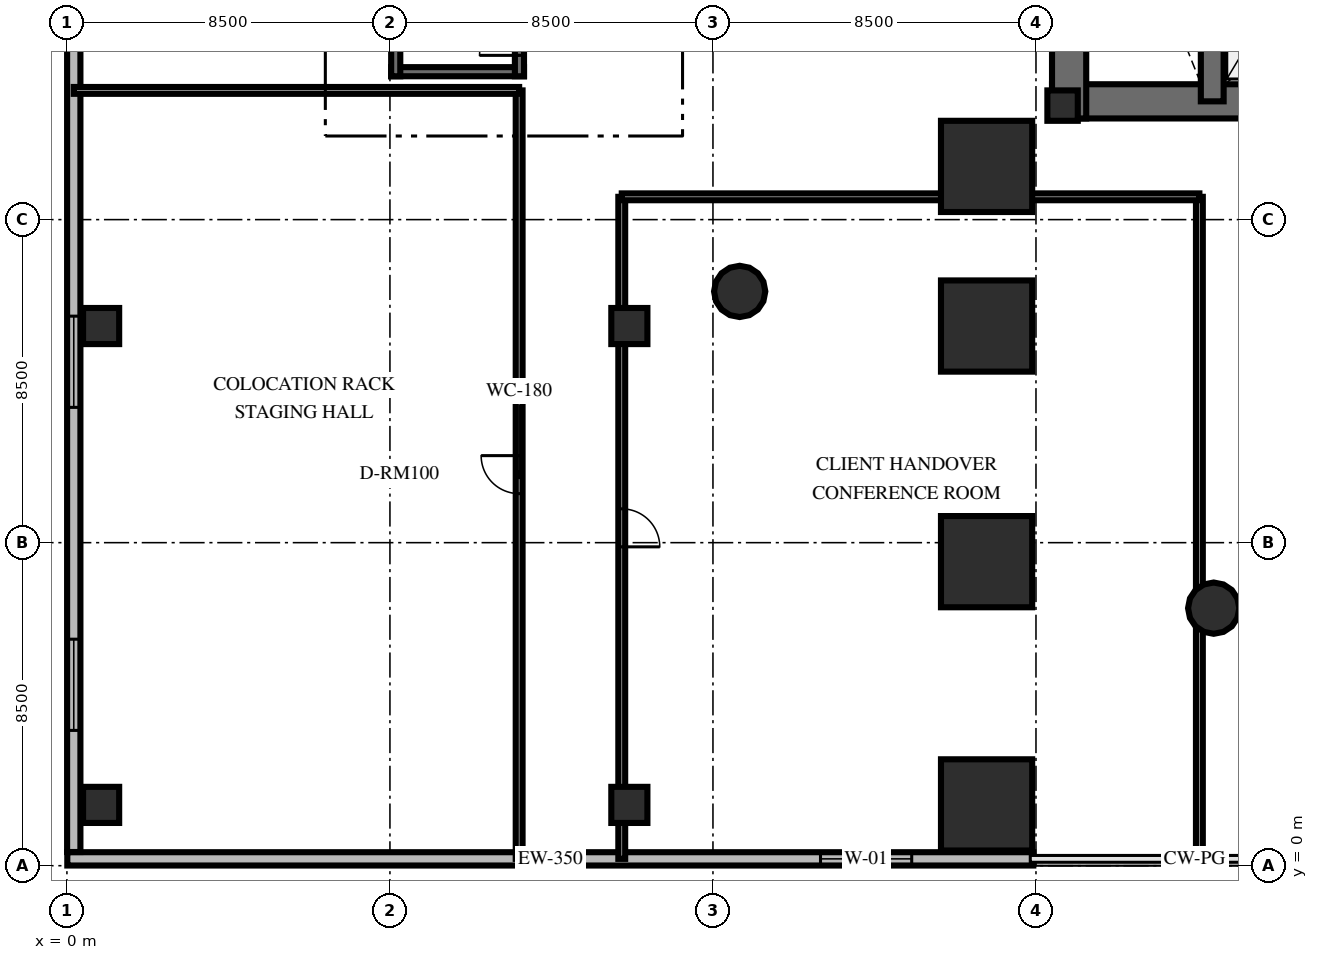
"""IFC4 building model, lengths in metres.
Left out: names, types, materials, properties, quantities, classifications, styles, units other than length and angle.
Written with IfcOpenShell. Run it as: python <this file> out.ifc"""

import sys

from ifc_helpers import new_model, si_unit, direction, frame, frame_2d, origin, origin_2d, place, context, subcontext, project, spatial, rectangle, circle, extrude, element, fill, save


model = new_model("IFC4")
c1 = context("Model", 3, precision=1e-05, world=origin(), true_north=direction((0.0, 1.0)))
c2 = subcontext(c1, "Body", "Model", "MODEL_VIEW")
j1 = project(units=[si_unit("LENGTHUNIT", "METRE"), si_unit("PLANEANGLEUNIT", "RADIAN")], contexts=[c1])
p1 = place(None, origin())
s1 = spatial("IfcSite", under=j1, at=p1, CompositionType="ELEMENT")
p2 = place(p1, origin())
s2 = spatial("IfcBuilding", under=s1, at=p2, CompositionType="ELEMENT")
p3 = place(p2, frame((0.0, 0.0, 25.2)))
s3 = spatial("IfcBuildingStorey", under=s2, at=p3, CompositionType="ELEMENT", Elevation=25.2)
p4 = place(p3, frame((25.922, 20.112, 0.0), z_axis=(0.0, 0.0, 1.0), x_axis=(1.0, 0.0, 0.0)))
e1 = element("IfcWall", 1, at=p4, inside=s3, PredefinedType="SHEAR", context=c2, shape_type="SweptSolid", body=[
    extrude(rectangle(XDim=16.166, YDim=0.9, at=frame_2d((8.083, 0.0))), origin(), (0.0, 0.0, 1.0), 4.8),
])
p5 = place(p3, frame((26.372, 19.662, 0.0), z_axis=(0.0, 0.0, 1.0), x_axis=(0.0, 1.0, 0.0)))
e2 = element("IfcWall", 2, at=p5, inside=s3, PredefinedType="SHEAR", context=c2, shape_type="SweptSolid", body=[
    extrude(rectangle(XDim=10.876, YDim=0.9, at=frame_2d((5.438, 0.0))), origin(), (0.0, 0.0, 1.0), 4.8),
])
p6 = place(p3, frame((30.138, 20.112, 0.0), z_axis=(0.0, 0.0, 1.0), x_axis=(0.0, 1.0, 0.0)))
e3 = element("IfcWall", 3, at=p6, inside=s3, PredefinedType="SHEAR", context=c2, shape_type="SweptSolid", body=[
    extrude(rectangle(XDim=9.976, YDim=0.6, at=frame_2d((4.988, 0.0))), origin(), (0.0, 0.0, 1.0), 4.8),
])
p7 = place(p3, frame((26.2, 20.0, 0.0), z_axis=(0.0, 0.0, 1.0), x_axis=(1.0, 0.0, 0.0)))
e4 = element("IfcColumn", 4, at=p7, inside=s3, PredefinedType="PILASTER", context=c2, shape_type="SweptSolid", body=[
    extrude(rectangle(XDim=0.8, YDim=0.8, at=origin_2d()), origin(), (0.0, 0.0, 1.0), 4.8),
])
p8 = place(p3, frame((8.532, 20.892, 0.0), z_axis=(0.0, 0.0, 1.0), x_axis=(1.0, 0.0, 0.0)))
e5 = element("IfcWall", 5, at=p8, inside=s3, PredefinedType="SHEAR", context=c2, shape_type="SweptSolid", body=[
    extrude(rectangle(XDim=3.496, YDim=0.24, at=frame_2d((1.748, 0.0))), origin(), (0.0, 0.0, 1.0), 4.8),
])
p9 = place(p3, frame((8.652, 20.772, 0.0), z_axis=(0.0, 0.0, 1.0), x_axis=(0.0, 1.0, 0.0)))
e6 = element("IfcWall", 6, at=p9, inside=s3, PredefinedType="SHEAR", context=c2, shape_type="SweptSolid", body=[
    extrude(rectangle(XDim=9.556, YDim=0.24, at=frame_2d((4.778, 0.0))), origin(), (0.0, 0.0, 1.0), 4.8),
])
p10 = place(p3, frame((11.908, 20.772, 0.0), z_axis=(0.0, 0.0, 1.0), x_axis=(0.0, 1.0, 0.0)))
e7 = element("IfcWall", 7, at=p10, inside=s3, PredefinedType="SHEAR", context=c2, shape_type="SweptSolid", body=[
    extrude(rectangle(XDim=9.556, YDim=0.24, at=frame_2d((4.778, 0.0))), origin(), (0.0, 0.0, 1.0), 4.8),
])
p11 = place(p10, frame((0.55, 0.0, 0.0)))
e8 = element("IfcOpeningElement", 8, at=p11, cuts=e7, PredefinedType="OPENING", context=c2, shape_type="SweptSolid", body=[
    extrude(rectangle(XDim=1.05, YDim=2.15, at=frame_2d((0.525, 1.075))), frame((0.0, 0.13, 0.0), z_axis=(0.0, -1.0, 0.0), x_axis=(1.0, 0.0, 0.0)), (0.0, 0.0, 1.0), 0.26),
])
for number, where, z_axis, x_axis in (
    (9, (24.2, 1.6, 0.0), (0.0, 0.0, 1.0), (1.0, 0.0, 0.0)),
    (10, (24.2, 8.0, 0.0), (0.0, 0.0, 1.0), (1.0, 0.0, 0.0)),
    (11, (24.2, 14.2, 0.0), (0.0, 0.0, 1.0), (1.0, 0.0, 0.0)),
    (12, (24.2, 18.4, 0.0), (0.0, 0.0, 1.0), (1.0, 0.0, 0.0)),
):
    element("IfcColumn", number, at=place(p3, frame(where, z_axis=z_axis, x_axis=x_axis)), inside=s3, PredefinedType="USERDEFINED", context=c2, shape_type="SweptSolid", body=[
        extrude(rectangle(XDim=2.4, YDim=2.4, at=origin_2d()), origin(), (0.0, 0.0, 1.0), 4.52),
    ])
for number, where, z_axis, x_axis in (
    (13, (0.9, 1.6, 0.0), (0.0, 0.0, 1.0), (1.0, 0.0, 0.0)),
    (14, (0.9, 14.2, 0.0), (0.0, 0.0, 1.0), (1.0, 0.0, 0.0)),
    (15, (14.8, 1.6, 0.0), (0.0, 0.0, 1.0), (1.0, 0.0, 0.0)),
    (16, (14.8, 14.2, 0.0), (0.0, 0.0, 1.0), (1.0, 0.0, 0.0)),
):
    element("IfcColumn", number, at=place(p3, frame(where, z_axis=z_axis, x_axis=x_axis)), inside=s3, PredefinedType="COLUMN", context=c2, shape_type="SweptSolid", body=[
        extrude(rectangle(XDim=0.95, YDim=0.95, at=origin_2d()), origin(), (0.0, 0.0, 1.0), 4.8),
    ])
for number, where, z_axis, x_axis in (
    (17, (17.703, 15.111, 0.0), (0.0, 0.0, 1.0), (1.0, 0.0, 0.0)),
    (18, (30.176, 6.777, 0.0), (0.0, 0.0, 1.0), (1.0, 0.0, 0.0)),
):
    element("IfcColumn", number, at=place(p3, frame(where, z_axis=z_axis, x_axis=x_axis)), inside=s3, PredefinedType="COLUMN", context=c2, shape_type="SweptSolid", body=[
        extrude(circle(Radius=0.675, at=origin_2d()), origin(), (0.0, 0.0, 1.0), 4.8),
    ])
p12 = place(p3, frame((25.43, 0.18, 0.0), z_axis=(0.0, 0.0, 1.0), x_axis=(-1.0, 0.0, 0.0)))
e19 = element("IfcWall", 19, at=p12, inside=s3, PredefinedType="SOLIDWALL", context=c2, shape_type="SweptSolid", body=[
    extrude(rectangle(XDim=25.42, YDim=0.35, at=frame_2d((12.71, 0.0))), origin(), (0.0, 0.0, 1.0), 3.8),
])
p13 = place(p12, frame((3.2, 0.0, 0.85)))
e20 = element("IfcOpeningElement", 20, at=p13, cuts=e19, PredefinedType="OPENING", context=c2, shape_type="SweptSolid", body=[
    extrude(rectangle(XDim=2.4, YDim=2.4, at=frame_2d((1.2, 1.2))), frame((0.0, 0.185, 0.0), z_axis=(0.0, -1.0, 0.0), x_axis=(1.0, 0.0, 0.0)), (0.0, 0.0, 1.0), 0.37),
])
p14 = place(p3, frame((0.18, 0.36, 0.0), z_axis=(0.0, 0.0, 1.0), x_axis=(0.0, 1.0, 0.0)))
e21 = element("IfcWall", 21, at=p14, inside=s3, PredefinedType="SOLIDWALL", context=c2, shape_type="SweptSolid", body=[
    extrude(rectangle(XDim=51.28, YDim=0.35, at=frame_2d((25.64, 0.0))), origin(), (0.0, 0.0, 1.0), 3.8),
])
p15 = place(p14, frame((3.2, 0.0, 0.85)))
e22 = element("IfcOpeningElement", 22, at=p15, cuts=e21, PredefinedType="OPENING", context=c2, shape_type="SweptSolid", body=[
    extrude(rectangle(XDim=2.4, YDim=2.4, at=frame_2d((1.2, 1.2))), frame((0.0, 0.185, 0.0), z_axis=(0.0, -1.0, 0.0), x_axis=(1.0, 0.0, 0.0)), (0.0, 0.0, 1.0), 0.37),
])
p16 = place(p14, frame((11.7, 0.0, 0.85)))
e23 = element("IfcOpeningElement", 23, at=p16, cuts=e21, PredefinedType="OPENING", context=c2, shape_type="SweptSolid", body=[
    extrude(rectangle(XDim=2.4, YDim=2.4, at=frame_2d((1.2, 1.2))), frame((0.0, 0.185, 0.0), z_axis=(0.0, -1.0, 0.0), x_axis=(1.0, 0.0, 0.0)), (0.0, 0.0, 1.0), 0.37),
])
p17 = place(p14, frame((22.05, 0.0, 0.85)))
e24 = element("IfcOpeningElement", 24, at=p17, cuts=e21, PredefinedType="OPENING", context=c2, shape_type="SweptSolid", body=[
    extrude(rectangle(XDim=2.4, YDim=2.4, at=frame_2d((1.2, 1.2))), frame((0.0, 0.185, 0.0), z_axis=(0.0, -1.0, 0.0), x_axis=(1.0, 0.0, 0.0)), (0.0, 0.0, 1.0), 0.37),
])
p18 = place(p14, frame((37.2, 0.0, 0.85)))
e25 = element("IfcOpeningElement", 25, at=p18, cuts=e21, PredefinedType="OPENING", context=c2, shape_type="SweptSolid", body=[
    extrude(rectangle(XDim=2.4, YDim=2.4, at=frame_2d((1.2, 1.2))), frame((0.0, 0.185, 0.0), z_axis=(0.0, -1.0, 0.0), x_axis=(1.0, 0.0, 0.0)), (0.0, 0.0, 1.0), 0.37),
])
p19 = place(p3, frame((11.9, 0.18, 0.0), z_axis=(0.0, 0.0, 1.0), x_axis=(0.0, 1.0, 0.0)))
e26 = element("IfcWall", 26, at=p19, inside=s3, PredefinedType="PARTITIONING", context=c2, shape_type="SweptSolid", body=[
    extrude(rectangle(XDim=20.22, YDim=0.18, at=frame_2d((10.11, 0.0))), origin(), (0.0, 0.0, 1.0), 3.6),
])
p20 = place(p19, frame((9.61, 0.0, 0.0)))
e27 = element("IfcOpeningElement", 27, at=p20, cuts=e26, PredefinedType="OPENING", context=c2, shape_type="SweptSolid", body=[
    extrude(rectangle(XDim=1.0, YDim=2.15, at=frame_2d((0.5, 1.075))), frame((0.0, 0.1, 0.0), z_axis=(0.0, -1.0, 0.0), x_axis=(1.0, 0.0, 0.0)), (0.0, 0.0, 1.0), 0.2),
])
p21 = place(p3, frame((11.9, 20.4, 0.0), z_axis=(0.0, 0.0, 1.0), x_axis=(-1.0, 0.0, 0.0)))
e28 = element("IfcWall", 28, at=p21, inside=s3, PredefinedType="PARTITIONING", context=c2, shape_type="SweptSolid", body=[
    extrude(rectangle(XDim=11.72, YDim=0.18, at=frame_2d((5.86, 0.0))), origin(), (0.0, 0.0, 1.0), 3.6),
])
p22 = place(p3, frame((14.6, 17.6, 0.0), z_axis=(0.0, 0.0, 1.0), x_axis=(0.0, -1.0, 0.0)))
e29 = element("IfcWall", 29, at=p22, inside=s3, PredefinedType="PARTITIONING", context=c2, shape_type="SweptSolid", body=[
    extrude(rectangle(XDim=17.42, YDim=0.18, at=frame_2d((8.71, 0.0))), origin(), (0.0, 0.0, 1.0), 3.6),
])
p23 = place(p22, frame((8.21, 0.0, 0.0)))
e30 = element("IfcOpeningElement", 30, at=p23, cuts=e29, PredefinedType="OPENING", context=c2, shape_type="SweptSolid", body=[
    extrude(rectangle(XDim=1.0, YDim=2.15, at=frame_2d((0.5, 1.075))), frame((0.0, 0.1, 0.0), z_axis=(0.0, -1.0, 0.0), x_axis=(1.0, 0.0, 0.0)), (0.0, 0.0, 1.0), 0.2),
])
p24 = place(p3, frame((29.8, 0.18, 0.0), z_axis=(0.0, 0.0, 1.0), x_axis=(0.0, 1.0, 0.0)))
e31 = element("IfcWall", 31, at=p24, inside=s3, PredefinedType="PARTITIONING", context=c2, shape_type="SweptSolid", body=[
    extrude(rectangle(XDim=17.42, YDim=0.18, at=frame_2d((8.71, 0.0))), origin(), (0.0, 0.0, 1.0), 3.6),
])
p25 = place(p3, frame((29.8, 17.6, 0.0), z_axis=(0.0, 0.0, 1.0), x_axis=(-1.0, 0.0, 0.0)))
e32 = element("IfcWall", 32, at=p25, inside=s3, PredefinedType="PARTITIONING", context=c2, shape_type="SweptSolid", body=[
    extrude(rectangle(XDim=15.2, YDim=0.18, at=frame_2d((7.6, 0.0))), origin(), (0.0, 0.0, 1.0), 3.6),
])
p26 = place(p13, origin())
e33 = element("IfcWindow", 33, at=p26, inside=s3, PartitioningType="SINGLE_PANEL", PredefinedType="WINDOW", context=c2, shape_type="SweptSolid", body=[
    extrude(rectangle(XDim=2.4, YDim=2.4, at=frame_2d((1.2, 1.2))), frame((0.0, 0.03, 0.0), z_axis=(0.0, -1.0, 0.0), x_axis=(1.0, 0.0, 0.0)), (0.0, 0.0, 1.0), 0.06),
])
fill(e20, e33)
p27 = place(p15, origin())
e34 = element("IfcWindow", 34, at=p27, inside=s3, PartitioningType="SINGLE_PANEL", PredefinedType="WINDOW", context=c2, shape_type="SweptSolid", body=[
    extrude(rectangle(XDim=2.4, YDim=2.4, at=frame_2d((1.2, 1.2))), frame((0.0, 0.03, 0.0), z_axis=(0.0, -1.0, 0.0), x_axis=(1.0, 0.0, 0.0)), (0.0, 0.0, 1.0), 0.06),
])
fill(e22, e34)
p28 = place(p16, origin())
e35 = element("IfcWindow", 35, at=p28, inside=s3, PartitioningType="SINGLE_PANEL", PredefinedType="WINDOW", context=c2, shape_type="SweptSolid", body=[
    extrude(rectangle(XDim=2.4, YDim=2.4, at=frame_2d((1.2, 1.2))), frame((0.0, 0.03, 0.0), z_axis=(0.0, -1.0, 0.0), x_axis=(1.0, 0.0, 0.0)), (0.0, 0.0, 1.0), 0.06),
])
fill(e23, e35)
p29 = place(p11, origin())
e36 = element("IfcDoor", 36, at=p29, inside=s3, OperationType="SINGLE_SWING_LEFT", PredefinedType="DOOR", context=c2, shape_type="SweptSolid", body=[
    extrude(rectangle(XDim=1.05, YDim=2.15, at=frame_2d((0.525, 1.075))), frame((0.0, 0.025, 0.0), z_axis=(0.0, -1.0, 0.0), x_axis=(1.0, 0.0, 0.0)), (0.0, 0.0, 1.0), 0.05),
])
fill(e8, e36)
p30 = place(p20, origin())
e37 = element("IfcDoor", 37, at=p30, inside=s3, OperationType="SINGLE_SWING_RIGHT", PredefinedType="DOOR", context=c2, shape_type="SweptSolid", body=[
    extrude(rectangle(XDim=1.0, YDim=2.15, at=frame_2d((0.5, 1.075))), frame((0.0, 0.025, 0.0), z_axis=(0.0, -1.0, 0.0), x_axis=(1.0, 0.0, 0.0)), (0.0, 0.0, 1.0), 0.05),
])
fill(e27, e37)
p31 = place(p23, origin())
e38 = element("IfcDoor", 38, at=p31, inside=s3, OperationType="SINGLE_SWING_RIGHT", PredefinedType="DOOR", context=c2, shape_type="SweptSolid", body=[
    extrude(rectangle(XDim=1.0, YDim=2.15, at=frame_2d((0.5, 1.075))), frame((0.0, 0.025, 0.0), z_axis=(0.0, -1.0, 0.0), x_axis=(1.0, 0.0, 0.0)), (0.0, 0.0, 1.0), 0.05),
])
fill(e30, e38)
save(model, sys.argv[1])
